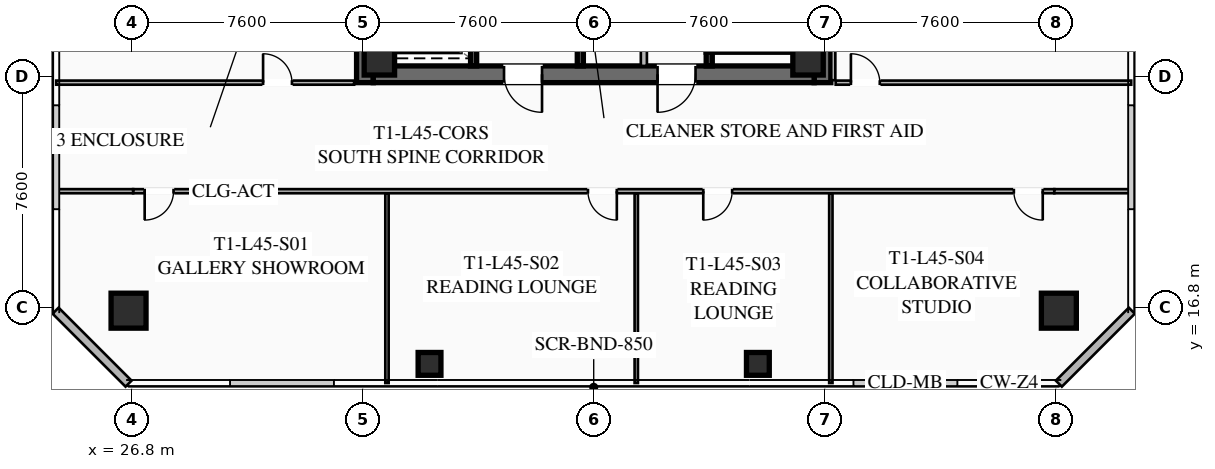
"""IFC4 building model, lengths in metres.
Left out: names, types, materials, properties, quantities, classifications, styles, units other than length and angle.
Written with IfcOpenShell. Run it as: python <this file> out.ifc"""

import sys

from ifc_helpers import new_model, si_unit, direction, frame, frame_2d, origin, origin_2d, place, context, subcontext, project, spatial, rectangle, hollow_rectangle, extrude, element, fill, save


model = new_model("IFC4")
c1 = context("Model", 3, precision=1e-05, world=origin(), true_north=direction((0.0, 1.0)))
c2 = subcontext(c1, "Body", "Model", "MODEL_VIEW")
j1 = project(units=[si_unit("LENGTHUNIT", "METRE"), si_unit("PLANEANGLEUNIT", "RADIAN")], contexts=[c1])
p1 = place(None, origin())
s1 = spatial("IfcSite", under=j1, at=p1, CompositionType="ELEMENT")
p2 = place(p1, origin())
s2 = spatial("IfcBuilding", under=s1, at=p2, CompositionType="ELEMENT")
p3 = place(p2, frame((0.0, 0.0, 167.65)))
s3 = spatial("IfcBuildingStorey", under=s2, at=p3, CompositionType="ELEMENT", Elevation=167.65)
for number, where, z_axis, x_axis in (
    (1, (34.475, 24.2, 0.0), (0.0, 0.0, 1.0), (0.0, 1.0, 0.0)),
    (2, (49.525, 39.8, 0.0), (0.0, 0.0, 1.0), (0.0, -1.0, 0.0)),
):
    element("IfcWall", number, at=place(p3, frame(where, z_axis=z_axis, x_axis=x_axis)), inside=s3, PredefinedType="SHEAR", context=c2, shape_type="SweptSolid", body=[
        extrude(rectangle(XDim=15.6, YDim=0.55, at=frame_2d((7.8, 0.0))), origin(), (0.0, 0.0, 1.0), 3.55),
    ])
p4 = place(p3, frame((49.25, 24.475, 0.0), z_axis=(0.0, 0.0, 1.0), x_axis=(-1.0, 0.0, 0.0)))
e3 = element("IfcWall", 3, at=p4, inside=s3, PredefinedType="SHEAR", context=c2, shape_type="SweptSolid", body=[
    extrude(rectangle(XDim=14.5, YDim=0.55, at=frame_2d((7.25, 0.0))), origin(), (0.0, 0.0, 1.0), 3.55),
])
p5 = place(p4, frame((8.95, 0.0, 0.0)))
e4 = element("IfcOpeningElement", 4, at=p5, cuts=e3, PredefinedType="OPENING", context=c2, shape_type="SweptSolid", body=[
    extrude(rectangle(XDim=1.25, YDim=2.25, at=frame_2d((0.625, 1.125))), frame((0.0, 0.285, 0.0), z_axis=(0.0, -1.0, 0.0), x_axis=(1.0, 0.0, 0.0)), (0.0, 0.0, 1.0), 0.57),
])
p6 = place(p4, frame((3.9, 0.0, 0.0)))
e5 = element("IfcOpeningElement", 5, at=p6, cuts=e3, PredefinedType="OPENING", context=c2, shape_type="SweptSolid", body=[
    extrude(rectangle(XDim=1.25, YDim=2.25, at=frame_2d((0.625, 1.125))), frame((0.0, 0.285, 0.0), z_axis=(0.0, -1.0, 0.0), x_axis=(1.0, 0.0, 0.0)), (0.0, 0.0, 1.0), 0.57),
])
for number, where, z_axis, x_axis in (
    (6, (34.95, 24.95, 0.0), (0.0, 0.0, 1.0), (1.0, 0.0, 0.0)),
    (7, (49.05, 24.95, 0.0), (0.0, 0.0, 1.0), (1.0, 0.0, 0.0)),
):
    element("IfcColumn", number, at=place(p3, frame(where, z_axis=z_axis, x_axis=x_axis)), inside=s3, PredefinedType="COLUMN", context=c2, shape_type="SweptSolid", body=[
        extrude(hollow_rectangle(XDim=1.0, YDim=1.0, WallThickness=0.04, at=origin_2d()), origin(), (0.0, 0.0, 1.0), 3.37),
    ])
for number, where, z_axis, x_axis in (
    (8, (26.7, 16.7, 0.0), (0.0, 0.0, 1.0), (1.0, 0.0, 0.0)),
    (9, (57.3, 16.7, 0.0), (0.0, 0.0, 1.0), (1.0, 0.0, 0.0)),
):
    element("IfcColumn", number, at=place(p3, frame(where, z_axis=z_axis, x_axis=x_axis)), inside=s3, PredefinedType="COLUMN", context=c2, shape_type="SweptSolid", body=[
        extrude(hollow_rectangle(XDim=1.15, YDim=1.15, WallThickness=0.045, at=origin_2d()), origin(), (0.0, 0.0, 1.0), 3.37),
    ])
for number, where, z_axis, x_axis in (
    (10, (36.6, 14.95, 0.0), (0.0, 0.0, 1.0), (1.0, 0.0, 0.0)),
    (11, (47.4, 14.95, 0.0), (0.0, 0.0, 1.0), (1.0, 0.0, 0.0)),
):
    element("IfcColumn", number, at=place(p3, frame(where, z_axis=z_axis, x_axis=x_axis)), inside=s3, PredefinedType="COLUMN", context=c2, shape_type="SweptSolid", body=[
        extrude(hollow_rectangle(XDim=0.75, YDim=0.75, WallThickness=0.032, at=origin_2d()), origin(), (0.0, 0.0, 1.0), 3.37),
    ])
for number, where, z_axis, x_axis in (
    (12, (26.7, 14.3, 0.0), (0.0, 0.0, 1.0), (-0.707, 0.707, 0.0)),
    (13, (59.7, 16.7, 0.0), (0.0, 0.0, 1.0), (-0.707, -0.707, 0.0)),
):
    element("IfcWall", number, at=place(p3, frame(where, z_axis=z_axis, x_axis=x_axis)), inside=s3, PredefinedType="SOLIDWALL", context=c2, shape_type="SweptSolid", body=[
        extrude(rectangle(XDim=3.394, YDim=0.28, at=frame_2d((1.697, 0.0))), origin(), (0.0, 0.0, 1.0), 3.37),
    ])
p7 = place(p3, frame((45.8, 32.8, 0.0), z_axis=(0.0, 0.0, 1.0), x_axis=(0.0, -1.0, 0.0)))
e14 = element("IfcWall", 14, at=p7, inside=s3, PredefinedType="SHEAR", context=c2, shape_type="SweptSolid", body=[
    extrude(rectangle(XDim=8.05, YDim=0.2, at=frame_2d((4.025, 0.0))), origin(), (0.0, 0.0, 1.0), 3.37),
])
p8 = place(p7, frame((0.45, 0.0, 0.0)))
e15 = element("IfcOpeningElement", 15, at=p8, cuts=e14, PredefinedType="OPENING", context=c2, shape_type="SweptSolid", body=[
    extrude(rectangle(XDim=1.15, YDim=2.2, at=frame_2d((0.575, 1.1))), frame((0.0, 0.11, 0.0), z_axis=(0.0, -1.0, 0.0), x_axis=(1.0, 0.0, 0.0)), (0.0, 0.0, 1.0), 0.22),
])
p9 = place(p3, frame((41.56, 24.75, 0.0), z_axis=(0.0, 0.0, 1.0), x_axis=(0.0, 1.0, 0.0)))
e16 = element("IfcWall", 16, at=p9, inside=s3, PredefinedType="SHEAR", context=c2, shape_type="SweptSolid", body=[
    extrude(rectangle(XDim=14.5, YDim=0.2, at=frame_2d((7.25, 0.0))), origin(), (0.0, 0.0, 1.0), 3.37),
])
p10 = place(p3, frame((38.05, 24.75, 0.0), z_axis=(0.0, 0.0, 1.0), x_axis=(0.0, 1.0, 0.0)))
e17 = element("IfcWall", 17, at=p10, inside=s3, PredefinedType="SHEAR", context=c2, shape_type="SweptSolid", body=[
    extrude(rectangle(XDim=6.45, YDim=0.2, at=frame_2d((3.225, 0.0))), origin(), (0.0, 0.0, 1.0), 3.37),
])
p11 = place(p10, frame((4.875, 0.0, 0.0)))
e18 = element("IfcOpeningElement", 18, at=p11, cuts=e17, PredefinedType="OPENING", context=c2, shape_type="SweptSolid", body=[
    extrude(rectangle(XDim=1.3, YDim=2.25, at=frame_2d((0.65, 1.125))), frame((0.0, 0.11, 0.0), z_axis=(0.0, -1.0, 0.0), x_axis=(1.0, 0.0, 0.0)), (0.0, 0.0, 1.0), 0.22),
])
p12 = place(p10, frame((2.875, 0.0, 0.0)))
e19 = element("IfcOpeningElement", 19, at=p12, cuts=e17, PredefinedType="OPENING", context=c2, shape_type="SweptSolid", body=[
    extrude(rectangle(XDim=1.3, YDim=2.25, at=frame_2d((0.65, 1.125))), frame((0.0, 0.11, 0.0), z_axis=(0.0, -1.0, 0.0), x_axis=(1.0, 0.0, 0.0)), (0.0, 0.0, 1.0), 0.22),
])
p13 = place(p10, frame((0.675, 0.0, 0.0)))
e20 = element("IfcOpeningElement", 20, at=p13, cuts=e17, PredefinedType="OPENING", context=c2, shape_type="SweptSolid", body=[
    extrude(rectangle(XDim=1.3, YDim=2.25, at=frame_2d((0.65, 1.125))), frame((0.0, 0.11, 0.0), z_axis=(0.0, -1.0, 0.0), x_axis=(1.0, 0.0, 0.0)), (0.0, 0.0, 1.0), 0.22),
])
p14 = place(p3, frame((43.65, 24.75, 0.0), z_axis=(0.0, 0.0, 1.0), x_axis=(0.0, 1.0, 0.0)))
e21 = element("IfcWall", 21, at=p14, inside=s3, PredefinedType="SOLIDWALL", context=c2, shape_type="SweptSolid", body=[
    extrude(rectangle(XDim=6.9, YDim=0.2, at=frame_2d((3.45, 0.0))), origin(), (0.0, 0.0, 1.0), 2.723),
])
p15 = place(p14, frame((0.85, 0.0, 0.0)))
e22 = element("IfcOpeningElement", 22, at=p15, cuts=e21, PredefinedType="OPENING", context=c2, shape_type="SweptSolid", body=[
    extrude(rectangle(XDim=0.95, YDim=2.05, at=frame_2d((0.475, 1.025))), frame((0.0, 0.11, 0.0), z_axis=(0.0, -1.0, 0.0), x_axis=(1.0, 0.0, 0.0)), (0.0, 0.0, 1.0), 0.22),
])
p16 = place(p14, frame((4.8, 0.0, 0.0)))
e23 = element("IfcOpeningElement", 23, at=p16, cuts=e21, PredefinedType="OPENING", context=c2, shape_type="SweptSolid", body=[
    extrude(rectangle(XDim=1.05, YDim=2.2, at=frame_2d((0.525, 1.1))), frame((0.0, 0.11, 0.0), z_axis=(0.0, -1.0, 0.0), x_axis=(1.0, 0.0, 0.0)), (0.0, 0.0, 1.0), 0.22),
])
p17 = place(p3, frame((57.15, 20.63, 0.0), z_axis=(0.0, 0.0, 1.0), x_axis=(-1.0, 0.0, 0.0)))
e24 = element("IfcWall", 24, at=p17, inside=s3, PredefinedType="PARTITIONING", context=c2, shape_type="SweptSolid", body=[
    extrude(rectangle(XDim=30.3, YDim=0.135, at=frame_2d((15.15, 0.0))), origin(), (0.0, 0.0, 1.0), 2.723),
])
p18 = place(p17, frame((28.97, 0.0, 0.0)))
e25 = element("IfcOpeningElement", 25, at=p18, cuts=e24, PredefinedType="OPENING", context=c2, shape_type="SweptSolid", body=[
    extrude(rectangle(XDim=0.95, YDim=2.05, at=frame_2d((0.475, 1.025))), frame((0.0, 0.077, 0.0), z_axis=(0.0, -1.0, 0.0), x_axis=(1.0, 0.0, 0.0)), (0.0, 0.0, 1.0), 0.155),
])
p19 = place(p17, frame((14.39, 0.0, 0.0)))
e26 = element("IfcOpeningElement", 26, at=p19, cuts=e24, PredefinedType="OPENING", context=c2, shape_type="SweptSolid", body=[
    extrude(rectangle(XDim=0.95, YDim=2.05, at=frame_2d((0.475, 1.025))), frame((0.0, 0.077, 0.0), z_axis=(0.0, -1.0, 0.0), x_axis=(1.0, 0.0, 0.0)), (0.0, 0.0, 1.0), 0.155),
])
p20 = place(p17, frame((10.596, 0.0, 0.0)))
e27 = element("IfcOpeningElement", 27, at=p20, cuts=e24, PredefinedType="OPENING", context=c2, shape_type="SweptSolid", body=[
    extrude(rectangle(XDim=0.95, YDim=2.05, at=frame_2d((0.475, 1.025))), frame((0.0, 0.077, 0.0), z_axis=(0.0, -1.0, 0.0), x_axis=(1.0, 0.0, 0.0)), (0.0, 0.0, 1.0), 0.155),
])
p21 = place(p17, frame((0.38, 0.0, 0.0)))
e28 = element("IfcOpeningElement", 28, at=p21, cuts=e24, PredefinedType="OPENING", context=c2, shape_type="SweptSolid", body=[
    extrude(rectangle(XDim=0.95, YDim=2.05, at=frame_2d((0.475, 1.025))), frame((0.0, 0.077, 0.0), z_axis=(0.0, -1.0, 0.0), x_axis=(1.0, 0.0, 0.0)), (0.0, 0.0, 1.0), 0.155),
])
for number, where, z_axis, x_axis in (
    (29, (24.32, 20.63, 0.0), (0.0, 0.0, 1.0), (1.0, 0.0, 0.0)),
    (30, (57.15, 20.63, 0.0), (0.0, 0.0, 1.0), (1.0, 0.0, 0.0)),
):
    element("IfcWall", number, at=place(p3, frame(where, z_axis=z_axis, x_axis=x_axis)), inside=s3, PredefinedType="PARTITIONING", context=c2, shape_type="SweptSolid", body=[
        extrude(rectangle(XDim=2.53, YDim=0.135, at=frame_2d((1.265, 0.0))), origin(), (0.0, 0.0, 1.0), 2.723),
    ])
for number, where, z_axis, x_axis in (
    (31, (35.2, 14.32, 0.0), (0.0, 0.0, 1.0), (0.0, 1.0, 0.0)),
    (32, (43.4, 14.32, 0.0), (0.0, 0.0, 1.0), (0.0, 1.0, 0.0)),
    (33, (49.8, 14.32, 0.0), (0.0, 0.0, 1.0), (0.0, 1.0, 0.0)),
):
    element("IfcWall", number, at=place(p3, frame(where, z_axis=z_axis, x_axis=x_axis)), inside=s3, PredefinedType="PARTITIONING", context=c2, shape_type="SweptSolid", body=[
        extrude(rectangle(XDim=6.23, YDim=0.11, at=frame_2d((3.115, 0.0))), origin(), (0.0, 0.0, 1.0), 2.723),
    ])
p22 = place(p3, frame((49.88, 39.72, 0.0), z_axis=(0.0, 0.0, 1.0), x_axis=(0.0, -1.0, 0.0)))
e34 = element("IfcWall", 34, at=p22, inside=s3, PredefinedType="PARTITIONING", context=c2, shape_type="SweptSolid", body=[
    extrude(rectangle(XDim=15.44, YDim=0.135, at=frame_2d((7.72, 0.0))), origin(), (0.0, 0.0, 1.0), 2.723),
])
p23 = place(p3, frame((49.96, 24.2, 0.0), z_axis=(0.0, 0.0, 1.0), x_axis=(1.0, 0.0, 0.0)))
e35 = element("IfcWall", 35, at=p23, inside=s3, PredefinedType="PARTITIONING", context=c2, shape_type="SweptSolid", body=[
    extrude(rectangle(XDim=9.72, YDim=0.135, at=frame_2d((4.86, 0.0))), origin(), (0.0, 0.0, 1.0), 2.723),
])
p24 = place(p23, frame((0.5, 0.0, 0.0)))
e36 = element("IfcOpeningElement", 36, at=p24, cuts=e35, PredefinedType="OPENING", context=c2, shape_type="SweptSolid", body=[
    extrude(rectangle(XDim=0.95, YDim=2.05, at=frame_2d((0.475, 1.025))), frame((0.0, 0.077, 0.0), z_axis=(0.0, -1.0, 0.0), x_axis=(1.0, 0.0, 0.0)), (0.0, 0.0, 1.0), 0.155),
])
p25 = place(p3, frame((24.32, 24.2, 0.0), z_axis=(0.0, 0.0, 1.0), x_axis=(1.0, 0.0, 0.0)))
e37 = element("IfcWall", 37, at=p25, inside=s3, PredefinedType="PARTITIONING", context=c2, shape_type="SweptSolid", body=[
    extrude(rectangle(XDim=9.8, YDim=0.135, at=frame_2d((4.9, 0.0))), origin(), (0.0, 0.0, 1.0), 2.723),
])
p26 = place(p25, frame((6.805, 0.0, 0.0)))
e38 = element("IfcOpeningElement", 38, at=p26, cuts=e37, PredefinedType="OPENING", context=c2, shape_type="SweptSolid", body=[
    extrude(rectangle(XDim=0.95, YDim=2.05, at=frame_2d((0.475, 1.025))), frame((0.0, 0.077, 0.0), z_axis=(0.0, -1.0, 0.0), x_axis=(1.0, 0.0, 0.0)), (0.0, 0.0, 1.0), 0.155),
])
p27 = place(p5, origin())
e39 = element("IfcDoor", 39, at=p27, inside=s3, OperationType="SINGLE_SWING_LEFT", PredefinedType="DOOR", context=c2, shape_type="SweptSolid", body=[
    extrude(rectangle(XDim=1.25, YDim=2.25, at=frame_2d((0.625, 1.125))), frame((0.0, 0.025, 0.0), z_axis=(0.0, -1.0, 0.0), x_axis=(1.0, 0.0, 0.0)), (0.0, 0.0, 1.0), 0.05),
])
fill(e4, e39)
p28 = place(p6, origin())
e40 = element("IfcDoor", 40, at=p28, inside=s3, OperationType="SINGLE_SWING_RIGHT", PredefinedType="DOOR", context=c2, shape_type="SweptSolid", body=[
    extrude(rectangle(XDim=1.25, YDim=2.25, at=frame_2d((0.625, 1.125))), frame((0.0, 0.025, 0.0), z_axis=(0.0, -1.0, 0.0), x_axis=(1.0, 0.0, 0.0)), (0.0, 0.0, 1.0), 0.05),
])
fill(e5, e40)
p29 = place(p18, origin())
e41 = element("IfcDoor", 41, at=p29, inside=s3, OperationType="SINGLE_SWING_RIGHT", PredefinedType="DOOR", context=c2, shape_type="SweptSolid", body=[
    extrude(rectangle(XDim=0.95, YDim=2.05, at=frame_2d((0.475, 1.025))), frame((0.0, 0.025, 0.0), z_axis=(0.0, -1.0, 0.0), x_axis=(1.0, 0.0, 0.0)), (0.0, 0.0, 1.0), 0.05),
])
fill(e25, e41)
p30 = place(p19, origin())
e42 = element("IfcDoor", 42, at=p30, inside=s3, OperationType="SINGLE_SWING_LEFT", PredefinedType="DOOR", context=c2, shape_type="SweptSolid", body=[
    extrude(rectangle(XDim=0.95, YDim=2.05, at=frame_2d((0.475, 1.025))), frame((0.0, 0.025, 0.0), z_axis=(0.0, -1.0, 0.0), x_axis=(1.0, 0.0, 0.0)), (0.0, 0.0, 1.0), 0.05),
])
fill(e26, e42)
p31 = place(p20, origin())
e43 = element("IfcDoor", 43, at=p31, inside=s3, OperationType="SINGLE_SWING_RIGHT", PredefinedType="DOOR", context=c2, shape_type="SweptSolid", body=[
    extrude(rectangle(XDim=0.95, YDim=2.05, at=frame_2d((0.475, 1.025))), frame((0.0, 0.025, 0.0), z_axis=(0.0, -1.0, 0.0), x_axis=(1.0, 0.0, 0.0)), (0.0, 0.0, 1.0), 0.05),
])
fill(e27, e43)
p32 = place(p21, origin())
e44 = element("IfcDoor", 44, at=p32, inside=s3, OperationType="SINGLE_SWING_LEFT", PredefinedType="DOOR", context=c2, shape_type="SweptSolid", body=[
    extrude(rectangle(XDim=0.95, YDim=2.05, at=frame_2d((0.475, 1.025))), frame((0.0, 0.025, 0.0), z_axis=(0.0, -1.0, 0.0), x_axis=(1.0, 0.0, 0.0)), (0.0, 0.0, 1.0), 0.05),
])
fill(e28, e44)
p33 = place(p24, origin())
e45 = element("IfcDoor", 45, at=p33, inside=s3, OperationType="SINGLE_SWING_LEFT", PredefinedType="DOOR", context=c2, shape_type="SweptSolid", body=[
    extrude(rectangle(XDim=0.95, YDim=2.05, at=frame_2d((0.475, 1.025))), frame((0.0, 0.025, 0.0), z_axis=(0.0, -1.0, 0.0), x_axis=(1.0, 0.0, 0.0)), (0.0, 0.0, 1.0), 0.05),
])
fill(e36, e45)
p34 = place(p26, origin())
e46 = element("IfcDoor", 46, at=p34, inside=s3, OperationType="SINGLE_SWING_LEFT", PredefinedType="DOOR", context=c2, shape_type="SweptSolid", body=[
    extrude(rectangle(XDim=0.95, YDim=2.05, at=frame_2d((0.475, 1.025))), frame((0.0, 0.025, 0.0), z_axis=(0.0, -1.0, 0.0), x_axis=(1.0, 0.0, 0.0)), (0.0, 0.0, 1.0), 0.05),
])
fill(e38, e46)
save(model, sys.argv[1])
